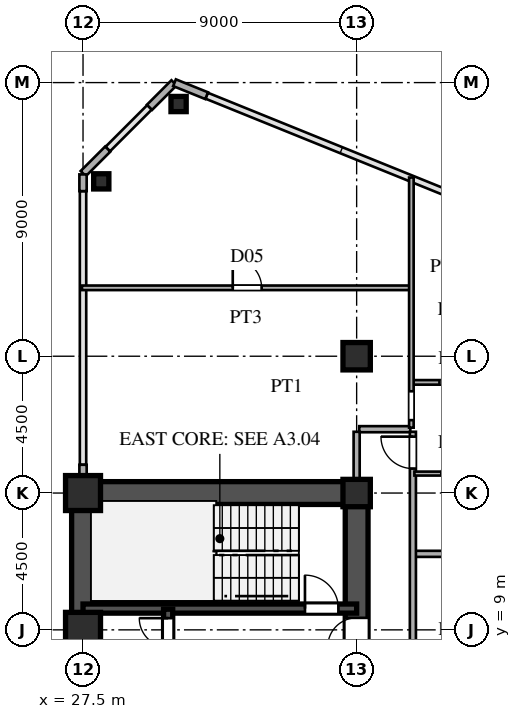
"""IFC4 building model, lengths in metres.
Left out: names, types, materials, properties, quantities, classifications, styles, units other than length and angle.
Written with IfcOpenShell. Run it as: python <this file> out.ifc"""

import sys

from ifc_helpers import new_model, si_unit, direction, frame, frame_2d, origin, origin_2d, place, context, subcontext, project, spatial, rectangle, hollow_rectangle, i_section, extrude, source, transform, mapped, element, fill, save


model = new_model("IFC4")
c1 = context("Model", 3, precision=1e-05, world=origin(), true_north=direction((0.0, 1.0)))
c2 = subcontext(c1, "Body", "Model", "MODEL_VIEW")
j1 = project(units=[si_unit("LENGTHUNIT", "METRE"), si_unit("PLANEANGLEUNIT", "RADIAN")], contexts=[c1])
p1 = place(None, origin())
s1 = spatial("IfcSite", under=j1, at=p1, CompositionType="ELEMENT")
p2 = place(p1, origin())
s2 = spatial("IfcBuilding", under=s1, at=p2, CompositionType="ELEMENT")
p3 = place(p2, frame((0.0, 0.0, 36.9)))
s3 = spatial("IfcBuildingStorey", under=s2, at=p3, CompositionType="ELEMENT", Elevation=36.9)
m1 = source(origin(), c2, "Body", "SweptSolid", [
    extrude(hollow_rectangle(XDim=1.15, YDim=1.15, WallThickness=0.048, at=origin_2d()), origin(), (0.0, 0.0, 1.0), 3.6),
])
for number, where, z_axis, x_axis in (
    (1, (27.5, 9.0, 0.0), (0.0, 0.0, 1.0), (1.0, 0.0, 0.0)),
    (2, (27.5, 13.5, 0.0), (0.0, 0.0, 1.0), (1.0, 0.0, 0.0)),
):
    element("IfcColumn", number, at=place(p3, frame(where, z_axis=z_axis, x_axis=x_axis)), inside=s3, PredefinedType="COLUMN", context=c2, shape_type="MappedRepresentation", body=[
        mapped(m1, transform((0.0, 0.0, 0.0), scale=1.0)),
    ])
m2 = source(origin(), c2, "Body", "SweptSolid", [
    extrude(i_section(OverallWidth=0.9, OverallDepth=0.9, WebThickness=0.036, FlangeThickness=0.055, at=origin_2d()), origin(), (0.0, 0.0, 1.0), 3.6),
])
for number, where, z_axis, x_axis in (
    (3, (36.5, 13.5, 0.0), (0.0, 0.0, 1.0), (1.0, 0.0, 0.0)),
    (4, (36.5, 18.0, 0.0), (0.0, 0.0, 1.0), (1.0, 0.0, 0.0)),
):
    element("IfcColumn", number, at=place(p3, frame(where, z_axis=z_axis, x_axis=x_axis)), inside=s3, PredefinedType="COLUMN", context=c2, shape_type="MappedRepresentation", body=[
        mapped(m2, transform((0.0, 0.0, 0.0), scale=1.0)),
    ])
m3 = source(origin(), c2, "Body", "SweptSolid", [
    extrude(hollow_rectangle(XDim=0.5, YDim=0.5, WallThickness=0.02, at=origin_2d()), origin(), (0.0, 0.0, 1.0), 3.6),
])
for number, where, z_axis, x_axis in (
    (5, (30.643, 26.295, 0.0), (0.0, 0.0, 1.0), (1.0, 0.0, 0.0)),
    (6, (28.1, 23.751, 0.0), (0.0, 0.0, 1.0), (1.0, 0.0, 0.0)),
):
    element("IfcColumn", number, at=place(p3, frame(where, z_axis=z_axis, x_axis=x_axis)), inside=s3, PredefinedType="COLUMN", context=c2, shape_type="MappedRepresentation", body=[
        mapped(m3, transform((0.0, 0.0, 0.0), scale=1.0)),
    ])
p4 = place(p3, frame((31.566, 26.569, 0.0), z_axis=(0.0, 0.0, 1.0), x_axis=(-0.927007103665, 0.375043770452, 0.0)))
e7 = element("IfcWall", 7, at=p4, inside=s3, PredefinedType="SOLIDWALL", context=c2, shape_type="SweptSolid", body=[
    extrude(rectangle(XDim=1.14, YDim=0.24, at=frame_2d((0.57, 0.0))), origin(), (0.0, 0.0, 1.0), 3.38),
])
for number, where, z_axis, x_axis in (
    (8, (30.493, 26.993, 0.0), (0.0, 0.0, 1.0), (-0.707, -0.707, 0.0)),
    (9, (28.313, 24.813, 0.0), (0.0, 0.0, 1.0), (-0.707, -0.707, 0.0)),
):
    element("IfcWall", number, at=place(p3, frame(where, z_axis=z_axis, x_axis=x_axis)), inside=s3, PredefinedType="SOLIDWALL", context=c2, shape_type="SweptSolid", body=[
        extrude(rectangle(XDim=1.14, YDim=0.24, at=frame_2d((0.57, 0.0))), origin(), (0.0, 0.0, 1.0), 3.38),
    ])
p5 = place(p3, frame((27.5, 13.88, 0.0), z_axis=(0.0, 0.0, 1.0), x_axis=(0.0, 1.0, 0.0)))
e10 = element("IfcWall", 10, at=p5, inside=s3, PredefinedType="SOLIDWALL", context=c2, shape_type="SweptSolid", body=[
    extrude(rectangle(XDim=0.55, YDim=0.24, at=frame_2d((0.275, 0.0))), origin(), (0.0, 0.0, 1.0), 2.88),
])
p6 = place(p3, frame((27.5, 23.43, 0.0), z_axis=(0.0, 0.0, 1.0), x_axis=(0.0, 1.0, 0.0)))
e11 = element("IfcWall", 11, at=p6, inside=s3, PredefinedType="SOLIDWALL", context=c2, shape_type="SweptSolid", body=[
    extrude(rectangle(XDim=0.55, YDim=0.24, at=frame_2d((0.275, 0.0))), origin(), (0.0, 0.0, 1.0), 3.38),
])
p7 = place(p3, frame((27.5, 1.3, 0.0), z_axis=(0.0, 0.0, 1.0), x_axis=(0.0, 1.0, 0.0)))
e12 = element("IfcWall", 12, at=p7, inside=s3, PredefinedType="SHEAR", context=c2, shape_type="SweptSolid", body=[
    extrude(rectangle(XDim=12.2, YDim=0.75, at=frame_2d((6.1, 0.0))), origin(), (0.0, 0.0, 1.0), 3.38),
])
p8 = place(p3, frame((27.5, 13.5, 0.0), z_axis=(0.0, 0.0, 1.0), x_axis=(1.0, 0.0, 0.0)))
e13 = element("IfcWall", 13, at=p8, inside=s3, PredefinedType="SHEAR", context=c2, shape_type="SweptSolid", body=[
    extrude(rectangle(XDim=9.0, YDim=0.75, at=frame_2d((4.5, 0.0))), origin(), (0.0, 0.0, 1.0), 3.38),
])
p9 = place(p3, frame((36.5, 8.2, 0.0), z_axis=(0.0, 0.0, 1.0), x_axis=(0.0, 1.0, 0.0)))
e14 = element("IfcWall", 14, at=p9, inside=s3, PredefinedType="SHEAR", context=c2, shape_type="SweptSolid", body=[
    extrude(rectangle(XDim=5.45, YDim=0.75, at=frame_2d((2.725, 0.0))), origin(), (0.0, 0.0, 1.0), 3.38),
])
p10 = place(p9, frame((0.245, 0.0, 0.0)))
e15 = element("IfcOpeningElement", 15, at=p10, cuts=e14, PredefinedType="OPENING", context=c2, shape_type="SweptSolid", body=[
    extrude(rectangle(XDim=0.95, YDim=2.15, at=frame_2d((0.475, 1.075))), frame((0.0, 0.385, 0.0), z_axis=(0.0, -1.0, 0.0), x_axis=(1.0, 0.0, 0.0)), (0.0, 0.0, 1.0), 0.77),
])
p11 = place(p3, frame((27.5, 9.7, 0.0), z_axis=(0.0, 0.0, 1.0), x_axis=(1.0, 0.0, 0.0)))
e16 = element("IfcWall", 16, at=p11, inside=s3, PredefinedType="SHEAR", context=c2, shape_type="SweptSolid", body=[
    extrude(rectangle(XDim=9.0, YDim=0.3, at=frame_2d((4.5, 0.0))), origin(), (0.0, 0.0, 1.0), 3.38),
])
p12 = place(p11, frame((7.3, 0.0, 0.0)))
e17 = element("IfcOpeningElement", 17, at=p12, cuts=e16, PredefinedType="OPENING", context=c2, shape_type="SweptSolid", body=[
    extrude(rectangle(XDim=1.1, YDim=2.2, at=frame_2d((0.55, 1.1))), frame((0.0, 0.16, 0.0), z_axis=(0.0, -1.0, 0.0), x_axis=(1.0, 0.0, 0.0)), (0.0, 0.0, 1.0), 0.32),
])
p13 = place(p3, frame((30.3, 8.15, 0.0), z_axis=(0.0, 0.0, 1.0), x_axis=(0.0, 1.0, 0.0)))
e18 = element("IfcWall", 18, at=p13, inside=s3, PredefinedType="SHEAR", context=c2, shape_type="SweptSolid", body=[
    extrude(rectangle(XDim=1.53, YDim=0.3, at=frame_2d((0.765, 0.0))), origin(), (0.0, 0.0, 1.0), 3.38),
])
p14 = place(p13, frame((0.285, 0.0, 0.0)))
e19 = element("IfcOpeningElement", 19, at=p14, cuts=e18, PredefinedType="OPENING", context=c2, shape_type="SweptSolid", body=[
    extrude(rectangle(XDim=0.95, YDim=2.15, at=frame_2d((0.475, 1.075))), frame((0.0, 0.16, 0.0), z_axis=(0.0, -1.0, 0.0), x_axis=(1.0, 0.0, 0.0)), (0.0, 0.0, 1.0), 0.32),
])
p15 = place(p3, frame((38.43, 11.5, 0.0), z_axis=(0.0, 0.0, 1.0), x_axis=(1.0, 0.0, 0.0)))
e20 = element("IfcWall", 20, at=p15, inside=s3, PredefinedType="PARTITIONING", context=c2, shape_type="SweptSolid", body=[
    extrude(rectangle(XDim=30.377, YDim=0.2, at=frame_2d((15.188, 0.0))), origin(), (0.0, 0.0, 1.0), 3.38),
])
p16 = place(p3, frame((38.4, 14.14, 0.0), z_axis=(0.0, 0.0, 1.0), x_axis=(1.0, 0.0, 0.0)))
e21 = element("IfcWall", 21, at=p16, inside=s3, PredefinedType="PARTITIONING", context=c2, shape_type="SweptSolid", body=[
    extrude(rectangle(XDim=2.65, YDim=0.13, at=frame_2d((1.325, 0.0))), origin(), (0.0, 0.0, 1.0), 3.38),
])
p17 = place(p16, frame((0.885, 0.0, 0.0)))
e22 = element("IfcOpeningElement", 22, at=p17, cuts=e21, PredefinedType="OPENING", context=c2, shape_type="SweptSolid", body=[
    extrude(rectangle(XDim=0.88, YDim=2.1, at=frame_2d((0.44, 1.05))), frame((0.0, 0.075, 0.0), z_axis=(0.0, -1.0, 0.0), x_axis=(1.0, 0.0, 0.0)), (0.0, 0.0, 1.0), 0.15),
])
p18 = place(p3, frame((36.585, 15.6, 0.0), z_axis=(0.0, 0.0, 1.0), x_axis=(1.0, 0.0, 0.0)))
e23 = element("IfcWall", 23, at=p18, inside=s3, PredefinedType="PARTITIONING", context=c2, shape_type="SweptSolid", body=[
    extrude(rectangle(XDim=1.68, YDim=0.2, at=frame_2d((0.84, 0.0))), origin(), (0.0, 0.0, 1.0), 3.38),
])
p19 = place(p3, frame((38.35, 17.14, 0.0), z_axis=(0.0, 0.0, 1.0), x_axis=(1.0, 0.0, 0.0)))
e24 = element("IfcWall", 24, at=p19, inside=s3, PredefinedType="PARTITIONING", context=c2, shape_type="SweptSolid", body=[
    extrude(rectangle(XDim=2.7, YDim=0.15, at=frame_2d((1.35, 0.0))), origin(), (0.0, 0.0, 1.0), 3.38),
])
p20 = place(p19, frame((0.875, 0.0, 0.0)))
e25 = element("IfcOpeningElement", 25, at=p20, cuts=e24, PredefinedType="OPENING", context=c2, shape_type="SweptSolid", body=[
    extrude(rectangle(XDim=0.95, YDim=2.15, at=frame_2d((0.475, 1.075))), frame((0.0, 0.085, 0.0), z_axis=(0.0, -1.0, 0.0), x_axis=(1.0, 0.0, 0.0)), (0.0, 0.0, 1.0), 0.17),
])
p21 = place(p3, frame((27.465, 20.25, 0.0), z_axis=(0.0, 0.0, 1.0), x_axis=(1.0, 0.0, 0.0)))
e26 = element("IfcWall", 26, at=p21, inside=s3, PredefinedType="PARTITIONING", context=c2, shape_type="SweptSolid", body=[
    extrude(rectangle(XDim=10.785, YDim=0.15, at=frame_2d((5.393, 0.0))), origin(), (0.0, 0.0, 1.0), 3.38),
])
p22 = place(p21, frame((4.96, 0.0, 0.0)))
e27 = element("IfcOpeningElement", 27, at=p22, cuts=e26, PredefinedType="OPENING", context=c2, shape_type="SweptSolid", body=[
    extrude(rectangle(XDim=0.95, YDim=2.15, at=frame_2d((0.475, 1.075))), frame((0.0, 0.085, 0.0), z_axis=(0.0, -1.0, 0.0), x_axis=(1.0, 0.0, 0.0)), (0.0, 0.0, 1.0), 0.17),
])
p23 = place(p3, frame((36.5, 13.88, 0.0), z_axis=(0.0, 0.0, 1.0), x_axis=(0.0, 1.0, 0.0)))
e28 = element("IfcWall", 28, at=p23, inside=s3, PredefinedType="PARTITIONING", context=c2, shape_type="SweptSolid", body=[
    extrude(rectangle(XDim=1.635, YDim=0.2, at=frame_2d((0.817, 0.0))), origin(), (0.0, 0.0, 1.0), 2.68),
])
p24 = place(p3, frame((38.3, 15.65, 0.0), z_axis=(0.0, 0.0, 1.0), x_axis=(0.0, 1.0, 0.0)))
e29 = element("IfcWall", 29, at=p24, inside=s3, PredefinedType="PARTITIONING", context=c2, shape_type="SweptSolid", body=[
    extrude(rectangle(XDim=8.228, YDim=0.15, at=frame_2d((4.114, 0.0))), origin(), (0.0, 0.0, 1.0), 3.38),
])
p25 = place(p24, frame((0.248, 0.0, 0.0)))
e30 = element("IfcOpeningElement", 30, at=p25, cuts=e29, PredefinedType="OPENING", context=c2, shape_type="SweptSolid", body=[
    extrude(rectangle(XDim=0.95, YDim=2.15, at=frame_2d((0.475, 1.075))), frame((0.0, 0.085, 0.0), z_axis=(0.0, -1.0, 0.0), x_axis=(1.0, 0.0, 0.0)), (0.0, 0.0, 1.0), 0.17),
])
p26 = place(p3, frame((38.35, -15.515, 0.0), z_axis=(0.0, 0.0, 1.0), x_axis=(0.0, 1.0, 0.0)))
e31 = element("IfcWall", 31, at=p26, inside=s3, PredefinedType="PARTITIONING", context=c2, shape_type="SweptSolid", body=[
    extrude(rectangle(XDim=31.03, YDim=0.2, at=frame_2d((15.515, 0.0))), origin(), (0.0, 0.0, 1.0), 3.38),
])
p27 = place(p26, frame((0.16, 0.0, 0.0)))
e32 = element("IfcOpeningElement", 32, at=p27, cuts=e31, PredefinedType="OPENING", context=c2, shape_type="SweptSolid", body=[
    extrude(rectangle(XDim=1.05, YDim=2.25, at=frame_2d((0.525, 1.125))), frame((0.0, 0.11, 0.0), z_axis=(0.0, -1.0, 0.0), x_axis=(1.0, 0.0, 0.0)), (0.0, 0.0, 1.0), 0.22),
])
p28 = place(p26, frame((9.067, 0.0, 0.0)))
e33 = element("IfcOpeningElement", 33, at=p28, cuts=e31, PredefinedType="OPENING", context=c2, shape_type="SweptSolid", body=[
    extrude(rectangle(XDim=1.05, YDim=2.25, at=frame_2d((0.525, 1.125))), frame((0.0, 0.11, 0.0), z_axis=(0.0, -1.0, 0.0), x_axis=(1.0, 0.0, 0.0)), (0.0, 0.0, 1.0), 0.22),
])
p29 = place(p26, frame((20.567, 0.0, 0.0)))
e34 = element("IfcOpeningElement", 34, at=p29, cuts=e31, PredefinedType="OPENING", context=c2, shape_type="SweptSolid", body=[
    extrude(rectangle(XDim=1.05, YDim=2.25, at=frame_2d((0.525, 1.125))), frame((0.0, 0.11, 0.0), z_axis=(0.0, -1.0, 0.0), x_axis=(1.0, 0.0, 0.0)), (0.0, 0.0, 1.0), 0.22),
])
p30 = place(p26, frame((29.82, 0.0, 0.0)))
e35 = element("IfcOpeningElement", 35, at=p30, cuts=e31, PredefinedType="OPENING", context=c2, shape_type="SweptSolid", body=[
    extrude(rectangle(XDim=1.05, YDim=2.25, at=frame_2d((0.525, 1.125))), frame((0.0, 0.11, 0.0), z_axis=(0.0, -1.0, 0.0), x_axis=(1.0, 0.0, 0.0)), (0.0, 0.0, 1.0), 0.22),
])
m4 = source(origin(), c2, "Body", "SweptSolid", [
    extrude(rectangle(XDim=0.95, YDim=2.15, at=frame_2d((0.475, 1.075))), frame((0.0, 0.025, 0.0), z_axis=(0.0, -1.0, 0.0), x_axis=(1.0, 0.0, 0.0)), (0.0, 0.0, 1.0), 0.05),
])
p31 = place(p10, origin())
e36 = element("IfcDoor", 36, at=p31, inside=s3, OperationType="SINGLE_SWING_LEFT", PredefinedType="DOOR", context=c2, shape_type="MappedRepresentation", body=[
    mapped(m4, transform((0.0, 0.0, 0.0), scale=1.0)),
])
fill(e15, e36)
m5 = source(origin(), c2, "Body", "SweptSolid", [
    extrude(rectangle(XDim=1.1, YDim=2.2, at=frame_2d((0.55, 1.1))), frame((0.0, 0.025, 0.0), z_axis=(0.0, -1.0, 0.0), x_axis=(1.0, 0.0, 0.0)), (0.0, 0.0, 1.0), 0.05),
])
p32 = place(p12, origin())
e37 = element("IfcDoor", 37, at=p32, inside=s3, OperationType="SINGLE_SWING_LEFT", PredefinedType="DOOR", context=c2, shape_type="MappedRepresentation", body=[
    mapped(m5, transform((0.0, 0.0, 0.0), scale=1.0)),
])
fill(e17, e37)
p33 = place(p14, origin())
e38 = element("IfcDoor", 38, at=p33, inside=s3, OperationType="SINGLE_SWING_RIGHT", PredefinedType="DOOR", context=c2, shape_type="MappedRepresentation", body=[
    mapped(m4, transform((0.0, 0.0, 0.0), scale=1.0)),
])
fill(e19, e38)
m6 = source(origin(), c2, "Body", "SweptSolid", [
    extrude(rectangle(XDim=0.88, YDim=2.1, at=frame_2d((0.44, 1.05))), frame((0.0, 0.025, 0.0), z_axis=(0.0, -1.0, 0.0), x_axis=(1.0, 0.0, 0.0)), (0.0, 0.0, 1.0), 0.05),
])
p34 = place(p17, origin())
e39 = element("IfcDoor", 39, at=p34, inside=s3, OperationType="SINGLE_SWING_RIGHT", PredefinedType="DOOR", context=c2, shape_type="MappedRepresentation", body=[
    mapped(m6, transform((0.0, 0.0, 0.0), scale=1.0)),
])
fill(e22, e39)
m7 = source(origin(), c2, "Body", "SweptSolid", [
    extrude(rectangle(XDim=0.95, YDim=2.15, at=frame_2d((0.475, 1.075))), frame((0.0, 0.025, 0.0), z_axis=(0.0, -1.0, 0.0), x_axis=(1.0, 0.0, 0.0)), (0.0, 0.0, 1.0), 0.05),
])
p35 = place(p22, origin())
e40 = element("IfcDoor", 40, at=p35, inside=s3, OperationType="SINGLE_SWING_LEFT", PredefinedType="DOOR", context=c2, shape_type="MappedRepresentation", body=[
    mapped(m7, transform((0.0, 0.0, 0.0), scale=1.0)),
])
fill(e27, e40)
m8 = source(origin(), c2, "Body", "SweptSolid", [
    extrude(rectangle(XDim=1.05, YDim=2.25, at=frame_2d((0.525, 1.125))), frame((0.0, 0.025, 0.0), z_axis=(0.0, -1.0, 0.0), x_axis=(1.0, 0.0, 0.0)), (0.0, 0.0, 1.0), 0.05),
])
p36 = place(p30, origin())
e41 = element("IfcDoor", 41, at=p36, inside=s3, OperationType="SINGLE_SWING_RIGHT", PredefinedType="DOOR", context=c2, shape_type="MappedRepresentation", body=[
    mapped(m8, transform((0.0, 0.0, 0.0), scale=1.0)),
])
fill(e35, e41)
save(model, sys.argv[1])
